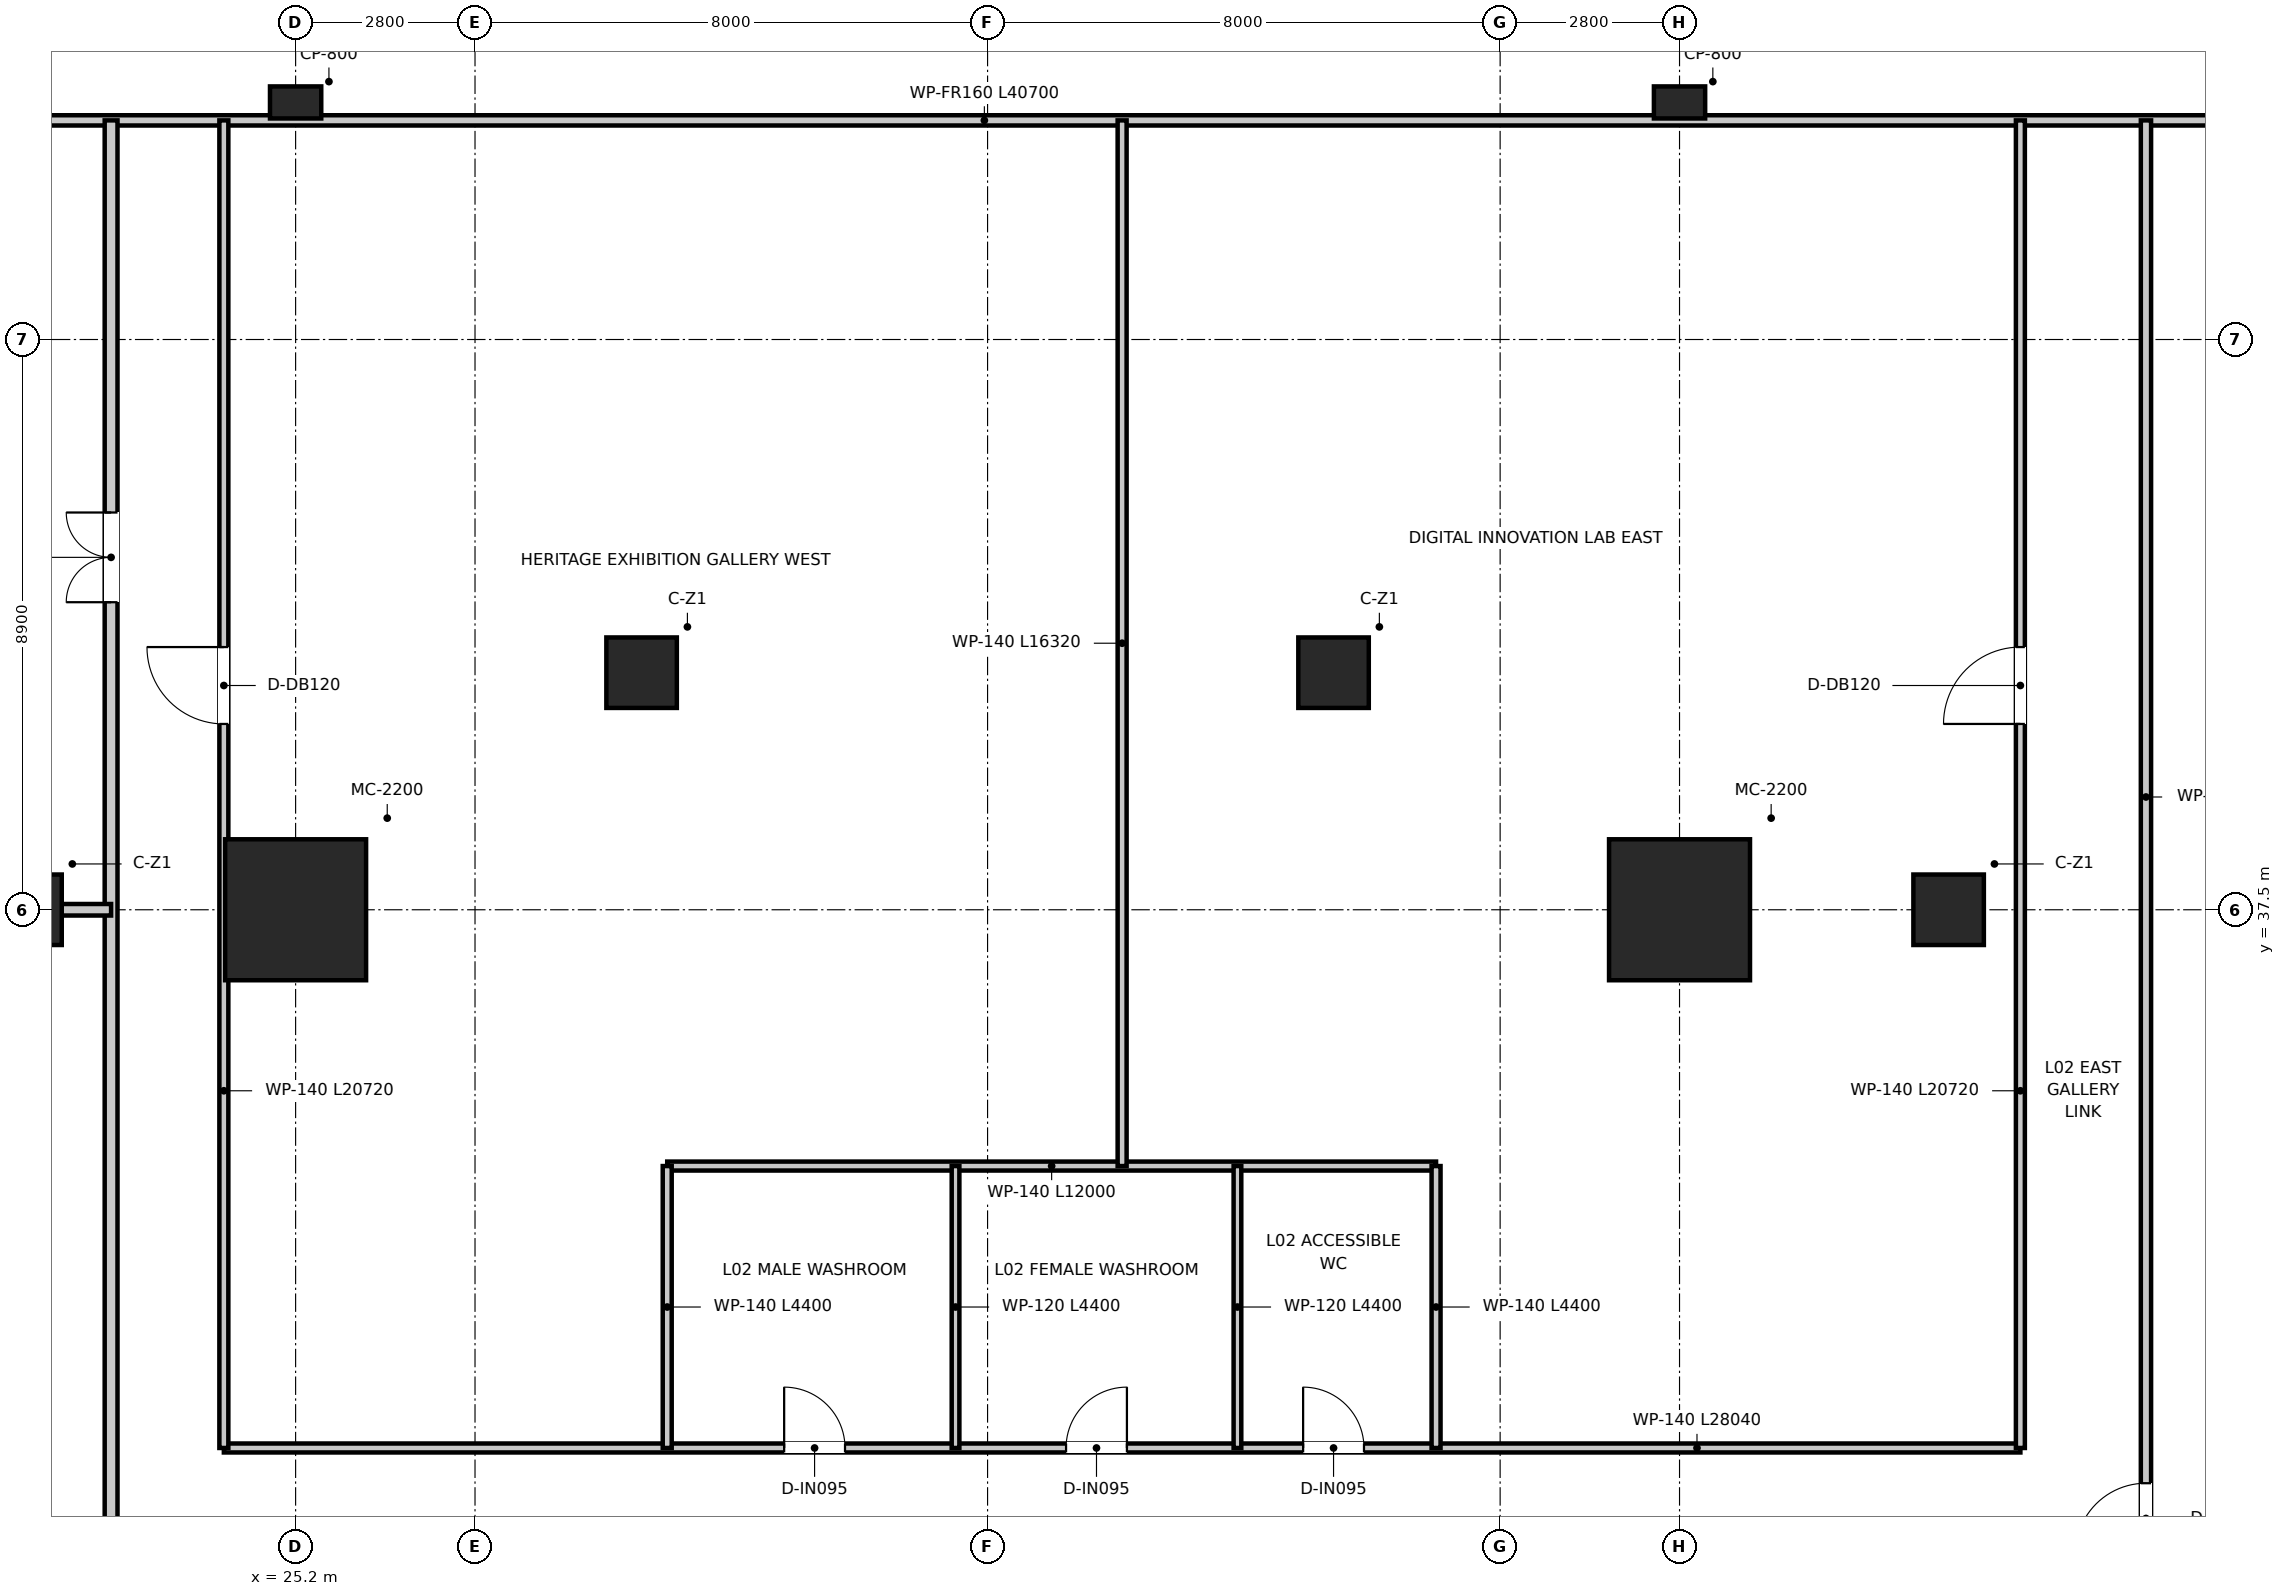
"""IFC4 building model, lengths in metres.
Left out: names, types, materials, properties, quantities, classifications, styles, units other than length and angle.
Written with IfcOpenShell. Run it as: python <this file> out.ifc"""

import sys

from ifc_helpers import new_model, si_unit, direction, frame, frame_2d, origin, origin_2d, place, context, subcontext, project, spatial, rectangle, extrude, source, transform, mapped, element, fill, save


model = new_model("IFC4")
c1 = context("Model", 3, precision=1e-05, world=origin(), true_north=direction((0.0, 1.0)))
c2 = subcontext(c1, "Body", "Model", "MODEL_VIEW")
j1 = project(units=[si_unit("LENGTHUNIT", "METRE"), si_unit("PLANEANGLEUNIT", "RADIAN")], contexts=[c1])
p1 = place(None, origin())
s1 = spatial("IfcSite", under=j1, at=p1, CompositionType="ELEMENT")
p2 = place(p1, origin())
s2 = spatial("IfcBuilding", under=s1, at=p2, CompositionType="ELEMENT")
p3 = place(p2, frame((0.0, 0.0, 10.4)))
s3 = spatial("IfcBuildingStorey", under=s2, at=p3, CompositionType="ELEMENT", Elevation=10.4)
m1 = source(origin(), c2, "Body", "SweptSolid", [
    extrude(rectangle(XDim=2.2, YDim=2.2, at=origin_2d()), origin(), (0.0, 0.0, 1.0), 5.0),
])
for number, where, z_axis, x_axis in (
    (1, (46.8, 37.5, 0.0), (0.0, 0.0, 1.0), (1.0, 0.0, 0.0)),
    (2, (25.2, 37.5, 0.0), (0.0, 0.0, 1.0), (1.0, 0.0, 0.0)),
):
    element("IfcColumn", number, at=place(p3, frame(where, z_axis=z_axis, x_axis=x_axis)), inside=s3, PredefinedType="USERDEFINED", context=c2, shape_type="MappedRepresentation", body=[
        mapped(m1, transform((0.0, 0.0, 0.0), x_axis=(1.0, 0.0, 0.0), y_axis=(0.0, 1.0, 0.0), z_axis=(0.0, 0.0, 1.0), scale=1.0)),
    ])
m2 = source(origin(), c2, "Body", "SweptSolid", [
    extrude(rectangle(XDim=1.1, YDim=1.1, at=origin_2d()), origin(), (0.0, 0.0, 1.0), 5.0),
])
for number, where, z_axis, x_axis in (
    (3, (21.0, 37.5, 0.0), (0.0, 0.0, 1.0), (1.0, 0.0, 0.0)),
    (4, (30.6, 41.2, 0.0), (0.0, 0.0, 1.0), (1.0, 0.0, 0.0)),
    (5, (41.4, 41.2, 0.0), (0.0, 0.0, 1.0), (1.0, 0.0, 0.0)),
    (6, (51.0, 37.5, 0.0), (0.0, 0.0, 1.0), (1.0, 0.0, 0.0)),
):
    element("IfcColumn", number, at=place(p3, frame(where, z_axis=z_axis, x_axis=x_axis)), inside=s3, PredefinedType="COLUMN", context=c2, shape_type="MappedRepresentation", body=[
        mapped(m2, transform((0.0, 0.0, 0.0), x_axis=(1.0, 0.0, 0.0), y_axis=(0.0, 1.0, 0.0), z_axis=(0.0, 0.0, 1.0), scale=1.0)),
    ])
m3 = source(origin(), c2, "Body", "SweptSolid", [
    extrude(rectangle(XDim=0.8, YDim=0.5, at=origin_2d()), origin(), (0.0, 0.0, 1.0), 5.0),
])
for number, where, z_axis, x_axis in (
    (7, (25.2, 50.1, 0.0), (0.0, 0.0, 1.0), (1.0, 0.0, 0.0)),
    (8, (46.8, 50.1, 0.0), (0.0, 0.0, 1.0), (1.0, 0.0, 0.0)),
):
    element("IfcColumn", number, at=place(p3, frame(where, z_axis=z_axis, x_axis=x_axis)), inside=s3, PredefinedType="PILASTER", context=c2, shape_type="MappedRepresentation", body=[
        mapped(m3, transform((0.0, 0.0, 0.0), x_axis=(1.0, 0.0, 0.0), y_axis=(0.0, 1.0, 0.0), z_axis=(0.0, 0.0, 1.0), scale=1.0)),
    ])
p4 = place(p3, frame((24.08, 29.1, 0.0), z_axis=(0.0, 0.0, 1.0), x_axis=(1.0, 0.0, 0.0)))
e9 = element("IfcWall", 9, at=p4, inside=s3, PredefinedType="PARTITIONING", context=c2, shape_type="SweptSolid", body=[
    extrude(rectangle(XDim=28.04, YDim=0.14, at=frame_2d((14.02, 0.0))), origin(), (0.0, 0.0, 1.0), 3.9),
])
p5 = place(p4, frame((8.745, 0.0, 0.0)))
e10 = element("IfcOpeningElement", 10, at=p5, cuts=e9, PredefinedType="OPENING", context=c2, shape_type="SweptSolid", body=[
    extrude(rectangle(XDim=0.95, YDim=2.1, at=frame_2d((0.475, 1.05))), frame((0.0, 0.08, 0.0), z_axis=(0.0, -1.0, 0.0), x_axis=(1.0, 0.0, 0.0)), (0.0, 0.0, 1.0), 0.16),
])
p6 = place(p4, frame((13.145, 0.0, 0.0)))
e11 = element("IfcOpeningElement", 11, at=p6, cuts=e9, PredefinedType="OPENING", context=c2, shape_type="SweptSolid", body=[
    extrude(rectangle(XDim=0.95, YDim=2.1, at=frame_2d((0.475, 1.05))), frame((0.0, 0.08, 0.0), z_axis=(0.0, -1.0, 0.0), x_axis=(1.0, 0.0, 0.0)), (0.0, 0.0, 1.0), 0.16),
])
p7 = place(p4, frame((16.845, 0.0, 0.0)))
e12 = element("IfcOpeningElement", 12, at=p7, cuts=e9, PredefinedType="OPENING", context=c2, shape_type="SweptSolid", body=[
    extrude(rectangle(XDim=0.95, YDim=2.1, at=frame_2d((0.475, 1.05))), frame((0.0, 0.08, 0.0), z_axis=(0.0, -1.0, 0.0), x_axis=(1.0, 0.0, 0.0)), (0.0, 0.0, 1.0), 0.16),
])
p8 = place(p3, frame((15.6, 49.82, 0.0), z_axis=(0.0, 0.0, 1.0), x_axis=(1.0, 0.0, 0.0)))
e13 = element("IfcWall", 13, at=p8, inside=s3, PredefinedType="PARTITIONING", context=c2, shape_type="SweptSolid", body=[
    extrude(rectangle(XDim=40.7, YDim=0.16, at=frame_2d((20.35, 0.0))), origin(), (0.0, 0.0, 1.0), 4.01),
])
p9 = place(p3, frame((22.32, 0.605, 0.0), z_axis=(0.0, 0.0, 1.0), x_axis=(0.0, 1.0, 0.0)))
e14 = element("IfcWall", 14, at=p9, inside=s3, PredefinedType="PARTITIONING", context=c2, shape_type="SweptSolid", body=[
    extrude(rectangle(XDim=49.215, YDim=0.2, at=frame_2d((24.607, 0.0))), origin(), (0.0, 0.0, 1.0), 4.0),
])
p10 = place(p9, frame((41.695, 0.0, 0.0)))
e15 = element("IfcOpeningElement", 15, at=p10, cuts=e14, PredefinedType="OPENING", context=c2, shape_type="SweptSolid", body=[
    extrude(rectangle(XDim=1.4, YDim=2.2, at=frame_2d((0.7, 1.1))), frame((0.0, 0.11, 0.0), z_axis=(0.0, -1.0, 0.0), x_axis=(1.0, 0.0, 0.0)), (0.0, 0.0, 1.0), 0.22),
])
p11 = place(p9, frame((8.845, 0.0, 0.0)))
e16 = element("IfcOpeningElement", 16, at=p11, cuts=e14, PredefinedType="OPENING", context=c2, shape_type="SweptSolid", body=[
    extrude(rectangle(XDim=1.1, YDim=2.15, at=frame_2d((0.55, 1.075))), frame((0.0, 0.11, 0.0), z_axis=(0.0, -1.0, 0.0), x_axis=(1.0, 0.0, 0.0)), (0.0, 0.0, 1.0), 0.22),
])
p12 = place(p3, frame((24.08, 29.1, 0.0), z_axis=(0.0, 0.0, 1.0), x_axis=(0.0, 1.0, 0.0)))
e17 = element("IfcWall", 17, at=p12, inside=s3, PredefinedType="PARTITIONING", context=c2, shape_type="SweptSolid", body=[
    extrude(rectangle(XDim=20.72, YDim=0.14, at=frame_2d((10.36, 0.0))), origin(), (0.0, 0.0, 1.0), 4.0),
])
p13 = place(p12, frame((11.3, 0.0, 0.0)))
e18 = element("IfcOpeningElement", 18, at=p13, cuts=e17, PredefinedType="OPENING", context=c2, shape_type="SweptSolid", body=[
    extrude(rectangle(XDim=1.2, YDim=2.15, at=frame_2d((0.6, 1.075))), frame((0.0, 0.08, 0.0), z_axis=(0.0, -1.0, 0.0), x_axis=(1.0, 0.0, 0.0)), (0.0, 0.0, 1.0), 0.16),
])
p14 = place(p3, frame((52.12, 29.1, 0.0), z_axis=(0.0, 0.0, 1.0), x_axis=(0.0, 1.0, 0.0)))
e19 = element("IfcWall", 19, at=p14, inside=s3, PredefinedType="PARTITIONING", context=c2, shape_type="SweptSolid", body=[
    extrude(rectangle(XDim=20.72, YDim=0.14, at=frame_2d((10.36, 0.0))), origin(), (0.0, 0.0, 1.0), 4.06),
])
p15 = place(p14, frame((11.3, 0.0, 0.0)))
e20 = element("IfcOpeningElement", 20, at=p15, cuts=e19, PredefinedType="OPENING", context=c2, shape_type="SweptSolid", body=[
    extrude(rectangle(XDim=1.2, YDim=2.15, at=frame_2d((0.6, 1.075))), frame((0.0, 0.08, 0.0), z_axis=(0.0, -1.0, 0.0), x_axis=(1.0, 0.0, 0.0)), (0.0, 0.0, 1.0), 0.16),
])
p16 = place(p3, frame((54.08, 0.605, 0.0), z_axis=(0.0, 0.0, 1.0), x_axis=(0.0, 1.0, 0.0)))
e21 = element("IfcWall", 21, at=p16, inside=s3, PredefinedType="PARTITIONING", context=c2, shape_type="SweptSolid", body=[
    extrude(rectangle(XDim=49.215, YDim=0.16, at=frame_2d((24.607, 0.0))), origin(), (0.0, 0.0, 1.0), 4.06),
])
p17 = place(p16, frame((14.845, 0.0, 0.0)))
e22 = element("IfcOpeningElement", 22, at=p17, cuts=e21, PredefinedType="OPENING", context=c2, shape_type="SweptSolid", body=[
    extrude(rectangle(XDim=1.1, YDim=2.15, at=frame_2d((0.55, 1.075))), frame((0.0, 0.09, 0.0), z_axis=(0.0, -1.0, 0.0), x_axis=(1.0, 0.0, 0.0)), (0.0, 0.0, 1.0), 0.18),
])
p18 = place(p16, frame((26.845, 0.0, 0.0)))
e23 = element("IfcOpeningElement", 23, at=p18, cuts=e21, PredefinedType="OPENING", context=c2, shape_type="SweptSolid", body=[
    extrude(rectangle(XDim=1.1, YDim=2.15, at=frame_2d((0.55, 1.075))), frame((0.0, 0.09, 0.0), z_axis=(0.0, -1.0, 0.0), x_axis=(1.0, 0.0, 0.0)), (0.0, 0.0, 1.0), 0.18),
])
p19 = place(p3, frame((31.0, 33.5, 0.0), z_axis=(0.0, 0.0, 1.0), x_axis=(1.0, 0.0, 0.0)))
e24 = element("IfcWall", 24, at=p19, inside=s3, PredefinedType="PARTITIONING", context=c2, shape_type="SweptSolid", body=[
    extrude(rectangle(XDim=12.0, YDim=0.14, at=frame_2d((6.0, 0.0))), origin(), (0.0, 0.0, 1.0), 4.7),
])
for number, where, z_axis, x_axis in (
    (25, (31.0, 29.1, 0.0), (0.0, 0.0, 1.0), (0.0, 1.0, 0.0)),
    (26, (43.0, 29.1, 0.0), (0.0, 0.0, 1.0), (0.0, 1.0, 0.0)),
):
    element("IfcWall", number, at=place(p3, frame(where, z_axis=z_axis, x_axis=x_axis)), inside=s3, PredefinedType="PARTITIONING", context=c2, shape_type="SweptSolid", body=[
        extrude(rectangle(XDim=4.4, YDim=0.14, at=frame_2d((2.2, 0.0))), origin(), (0.0, 0.0, 1.0), 4.15),
    ])
for number, where, z_axis, x_axis in (
    (27, (35.5, 29.1, 0.0), (0.0, 0.0, 1.0), (0.0, 1.0, 0.0)),
    (28, (39.9, 29.1, 0.0), (0.0, 0.0, 1.0), (0.0, 1.0, 0.0)),
):
    element("IfcWall", number, at=place(p3, frame(where, z_axis=z_axis, x_axis=x_axis)), inside=s3, PredefinedType="PARTITIONING", context=c2, shape_type="SweptSolid", body=[
        extrude(rectangle(XDim=4.4, YDim=0.12, at=frame_2d((2.2, 0.0))), origin(), (0.0, 0.0, 1.0), 4.15),
    ])
p20 = place(p3, frame((38.1, 33.5, 0.0), z_axis=(0.0, 0.0, 1.0), x_axis=(0.0, 1.0, 0.0)))
e29 = element("IfcWall", 29, at=p20, inside=s3, PredefinedType="PARTITIONING", context=c2, shape_type="SweptSolid", body=[
    extrude(rectangle(XDim=16.32, YDim=0.14, at=frame_2d((8.16, 0.0))), origin(), (0.0, 0.0, 1.0), 3.9),
])
p21 = place(p3, frame((0.305, 37.5, 0.0), z_axis=(0.0, 0.0, 1.0), x_axis=(1.0, 0.0, 0.0)))
e30 = element("IfcWall", 30, at=p21, inside=s3, PredefinedType="PARTITIONING", context=c2, shape_type="SweptSolid", body=[
    extrude(rectangle(XDim=22.015, YDim=0.18, at=frame_2d((11.008, 0.0))), origin(), (0.0, 0.0, 1.0), 2.9),
])
p22 = place(p5, origin())
e31 = element("IfcDoor", 31, at=p22, inside=s3, OperationType="SINGLE_SWING_LEFT", PredefinedType="DOOR", context=c2, shape_type="SweptSolid", body=[
    extrude(rectangle(XDim=0.95, YDim=2.1, at=frame_2d((0.475, 1.05))), frame((0.0, 0.025, 0.0), z_axis=(0.0, -1.0, 0.0), x_axis=(1.0, 0.0, 0.0)), (0.0, 0.0, 1.0), 0.05),
])
fill(e10, e31)
p23 = place(p6, origin())
e32 = element("IfcDoor", 32, at=p23, inside=s3, OperationType="SINGLE_SWING_RIGHT", PredefinedType="DOOR", context=c2, shape_type="SweptSolid", body=[
    extrude(rectangle(XDim=0.95, YDim=2.1, at=frame_2d((0.475, 1.05))), frame((0.0, 0.025, 0.0), z_axis=(0.0, -1.0, 0.0), x_axis=(1.0, 0.0, 0.0)), (0.0, 0.0, 1.0), 0.05),
])
fill(e11, e32)
p24 = place(p7, origin())
e33 = element("IfcDoor", 33, at=p24, inside=s3, OperationType="SINGLE_SWING_LEFT", PredefinedType="DOOR", context=c2, shape_type="SweptSolid", body=[
    extrude(rectangle(XDim=0.95, YDim=2.1, at=frame_2d((0.475, 1.05))), frame((0.0, 0.025, 0.0), z_axis=(0.0, -1.0, 0.0), x_axis=(1.0, 0.0, 0.0)), (0.0, 0.0, 1.0), 0.05),
])
fill(e12, e33)
p25 = place(p10, origin())
e34 = element("IfcDoor", 34, at=p25, inside=s3, OperationType="DOUBLE_DOOR_SINGLE_SWING", PredefinedType="DOOR", context=c2, shape_type="SweptSolid", body=[
    extrude(rectangle(XDim=1.4, YDim=2.2, at=frame_2d((0.7, 1.1))), frame((0.0, 0.025, 0.0), z_axis=(0.0, -1.0, 0.0), x_axis=(1.0, 0.0, 0.0)), (0.0, 0.0, 1.0), 0.05),
])
fill(e15, e34)
p26 = place(p13, origin())
e35 = element("IfcDoor", 35, at=p26, inside=s3, OperationType="SINGLE_SWING_RIGHT", PredefinedType="DOOR", context=c2, shape_type="SweptSolid", body=[
    extrude(rectangle(XDim=1.2, YDim=2.15, at=frame_2d((0.6, 1.075))), frame((0.0, 0.025, 0.0), z_axis=(0.0, -1.0, 0.0), x_axis=(1.0, 0.0, 0.0)), (0.0, 0.0, 1.0), 0.05),
])
fill(e18, e35)
p27 = place(p15, origin())
e36 = element("IfcDoor", 36, at=p27, inside=s3, OperationType="SINGLE_SWING_LEFT", PredefinedType="DOOR", context=c2, shape_type="SweptSolid", body=[
    extrude(rectangle(XDim=1.2, YDim=2.15, at=frame_2d((0.6, 1.075))), frame((0.0, 0.025, 0.0), z_axis=(0.0, -1.0, 0.0), x_axis=(1.0, 0.0, 0.0)), (0.0, 0.0, 1.0), 0.05),
])
fill(e20, e36)
p28 = place(p18, origin())
e37 = element("IfcDoor", 37, at=p28, inside=s3, OperationType="SINGLE_SWING_LEFT", PredefinedType="DOOR", context=c2, shape_type="SweptSolid", body=[
    extrude(rectangle(XDim=1.1, YDim=2.15, at=frame_2d((0.55, 1.075))), frame((0.0, 0.025, 0.0), z_axis=(0.0, -1.0, 0.0), x_axis=(1.0, 0.0, 0.0)), (0.0, 0.0, 1.0), 0.05),
])
fill(e23, e37)
save(model, sys.argv[1])
